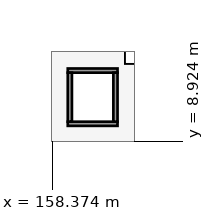
"""IFC4 building model, lengths in metres.
Left out: names, types, materials, properties, quantities, classifications, styles, units other than length and angle.
Written with IfcOpenShell. Run it as: python <this file> out.ifc"""

import sys

from ifc_helpers import new_model, si_unit, direction, frame, frame_2d, origin, place, context, subcontext, project, spatial, rectangle, extrude, element, fill, save


model = new_model("IFC4")
c1 = context("Model", 3, precision=1e-05, world=origin(), true_north=direction((0.0, 1.0)))
c2 = subcontext(c1, "Body", "Model", "MODEL_VIEW")
j1 = project(units=[si_unit("LENGTHUNIT", "METRE"), si_unit("PLANEANGLEUNIT", "RADIAN")], contexts=[c1])
p1 = place(None, origin())
s1 = spatial("IfcSite", under=j1, at=p1, CompositionType="ELEMENT")
p2 = place(p1, origin())
s2 = spatial("IfcBuilding", under=s1, at=p2, CompositionType="ELEMENT")
p3 = place(p2, frame((0.0, 0.0, 9.0)))
s3 = spatial("IfcBuildingStorey", under=s2, at=p3, CompositionType="ELEMENT", Elevation=9.0)
for number, where, z_axis, x_axis in (
    (1, (159.19, 9.85, 0.0), (0.0, 0.0, 1.0), (1.0, 0.0, 0.0)),
    (2, (159.19, 12.65, 0.0), (0.0, 0.0, 1.0), (1.0, 0.0, 0.0)),
):
    element("IfcWall", number, at=place(p3, frame(where, z_axis=z_axis, x_axis=x_axis)), inside=s3, PredefinedType="SOLIDWALL", context=c2, shape_type="SweptSolid", body=[
        extrude(rectangle(XDim=2.62, YDim=0.22, at=frame_2d((1.31, 0.0))), origin(), (0.0, 0.0, 1.0), 3.92),
    ])
p4 = place(p3, frame((159.3, 9.96, 0.0), z_axis=(0.0, 0.0, 1.0), x_axis=(0.0, 1.0, 0.0)))
e3 = element("IfcWall", 3, at=p4, inside=s3, PredefinedType="SOLIDWALL", context=c2, shape_type="SweptSolid", body=[
    extrude(rectangle(XDim=2.58, YDim=0.22, at=frame_2d((1.29, 0.0))), origin(), (0.0, 0.0, 1.0), 3.92),
])
p5 = place(p4, frame((0.79, 0.0, 0.0)))
e4 = element("IfcOpeningElement", 4, at=p5, cuts=e3, PredefinedType="OPENING", context=c2, shape_type="SweptSolid", body=[
    extrude(rectangle(XDim=1.0, YDim=2.15, at=frame_2d((0.5, 1.075))), frame((0.0, 0.12, 0.0), z_axis=(0.0, -1.0, 0.0), x_axis=(1.0, 0.0, 0.0)), (0.0, 0.0, 1.0), 0.24),
])
p6 = place(p3, frame((161.7, 9.96, 0.0), z_axis=(0.0, 0.0, 1.0), x_axis=(0.0, 1.0, 0.0)))
e5 = element("IfcWall", 5, at=p6, inside=s3, PredefinedType="SOLIDWALL", context=c2, shape_type="SweptSolid", body=[
    extrude(rectangle(XDim=2.58, YDim=0.22, at=frame_2d((1.29, 0.0))), origin(), (0.0, 0.0, 1.0), 3.92),
])
p7 = place(p5, origin())
e6 = element("IfcDoor", 6, at=p7, inside=s3, OperationType="SLIDING_TO_LEFT", PredefinedType="DOOR", context=c2, shape_type="SweptSolid", body=[
    extrude(rectangle(XDim=1.0, YDim=2.15, at=frame_2d((0.5, 1.075))), frame((0.0, 0.025, 0.0), z_axis=(0.0, -1.0, 0.0), x_axis=(1.0, 0.0, 0.0)), (0.0, 0.0, 1.0), 0.05),
])
fill(e4, e6)
save(model, sys.argv[1])
